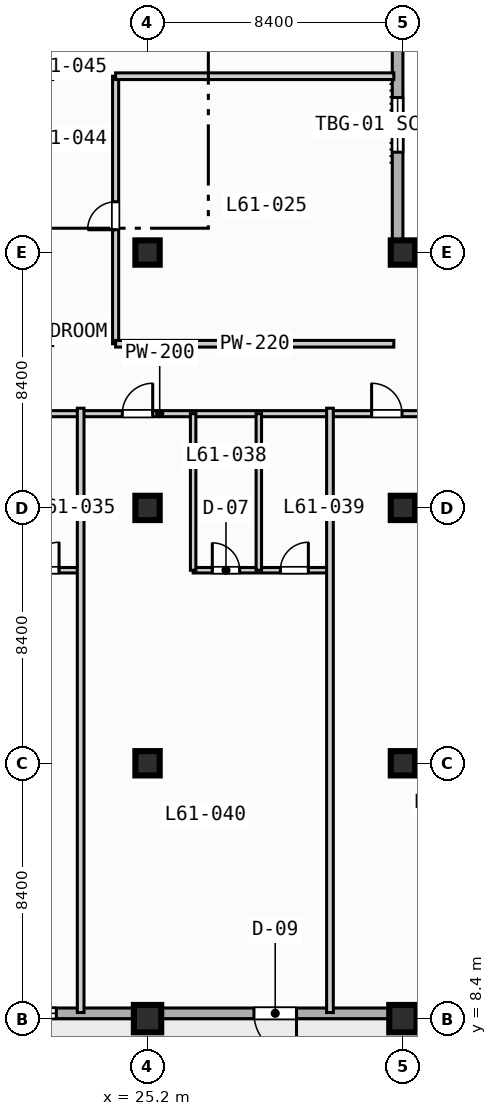
"""IFC4 building model, lengths in metres.
Left out: names, types, materials, properties, quantities, classifications, styles, units other than length and angle.
Written with IfcOpenShell. Run it as: python <this file> out.ifc"""

import sys

from ifc_helpers import new_model, si_unit, direction, frame, frame_2d, origin, origin_2d, place, context, subcontext, project, spatial, rectangle, extrude, element, fill, save


model = new_model("IFC4")
c1 = context("Model", 3, precision=1e-05, world=origin(), true_north=direction((0.0, 1.0)))
c2 = subcontext(c1, "Body", "Model", "MODEL_VIEW")
j1 = project(units=[si_unit("LENGTHUNIT", "METRE"), si_unit("PLANEANGLEUNIT", "RADIAN")], contexts=[c1])
p1 = place(None, origin())
s1 = spatial("IfcSite", under=j1, at=p1, CompositionType="ELEMENT")
p2 = place(p1, origin())
s2 = spatial("IfcBuilding", under=s1, at=p2, CompositionType="ELEMENT")
p3 = place(p2, frame((0.0, 0.0, 249.0)))
s3 = spatial("IfcBuildingStorey", under=s2, at=p3, CompositionType="ELEMENT", Elevation=249.0)
p4 = place(p3, frame((25.2, 8.4, 0.0), z_axis=(0.0, 0.0, 1.0), x_axis=(1.0, 0.0, 0.0)))
e1 = element("IfcColumn", 1, at=p4, inside=s3, PredefinedType="COLUMN", context=c2, shape_type="SweptSolid", body=[
    extrude(rectangle(XDim=0.9, YDim=0.9, at=origin_2d()), origin(), (0.0, 0.0, 1.0), 3.7),
])
for number, where, z_axis, x_axis in (
    (2, (25.2, 16.8, 0.0), (0.0, 0.0, 1.0), (1.0, 0.0, 0.0)),
    (3, (25.2, 25.2, 0.0), (0.0, 0.0, 1.0), (1.0, 0.0, 0.0)),
    (4, (25.2, 33.6, 0.0), (0.0, 0.0, 1.0), (1.0, 0.0, 0.0)),
):
    element("IfcColumn", number, at=place(p3, frame(where, z_axis=z_axis, x_axis=x_axis)), inside=s3, PredefinedType="COLUMN", context=c2, shape_type="SweptSolid", body=[
        extrude(rectangle(XDim=0.8, YDim=0.8, at=origin_2d()), origin(), (0.0, 0.0, 1.0), 3.7),
    ])
p5 = place(p3, frame((33.6, 8.4, 0.0), z_axis=(0.0, 0.0, 1.0), x_axis=(1.0, 0.0, 0.0)))
e5 = element("IfcColumn", 5, at=p5, inside=s3, PredefinedType="COLUMN", context=c2, shape_type="SweptSolid", body=[
    extrude(rectangle(XDim=0.9, YDim=0.9, at=origin_2d()), origin(), (0.0, 0.0, 1.0), 3.7),
])
for number, where, z_axis, x_axis in (
    (6, (33.6, 16.8, 0.0), (0.0, 0.0, 1.0), (1.0, 0.0, 0.0)),
    (7, (33.6, 25.2, 0.0), (0.0, 0.0, 1.0), (1.0, 0.0, 0.0)),
    (8, (33.6, 33.6, 0.0), (0.0, 0.0, 1.0), (1.0, 0.0, 0.0)),
):
    element("IfcColumn", number, at=place(p3, frame(where, z_axis=z_axis, x_axis=x_axis)), inside=s3, PredefinedType="COLUMN", context=c2, shape_type="SweptSolid", body=[
        extrude(rectangle(XDim=0.8, YDim=0.8, at=origin_2d()), origin(), (0.0, 0.0, 1.0), 3.7),
    ])
p6 = place(p3, frame((33.425, 72.425, 0.0), z_axis=(0.0, 0.0, 1.0), x_axis=(0.0, -1.0, 0.0)))
e9 = element("IfcWall", 9, at=p6, inside=s3, PredefinedType="STANDARD", context=c2, shape_type="SweptSolid", body=[
    extrude(rectangle(XDim=39.0, YDim=0.35, at=frame_2d((19.5, 0.0))), origin(), (0.0, 0.0, 1.0), 3.47),
])
p7 = place(p6, frame((33.725, 0.0, 0.85)))
e10 = element("IfcOpeningElement", 10, at=p7, cuts=e9, PredefinedType="OPENING", context=c2, shape_type="SweptSolid", body=[
    extrude(rectangle(XDim=1.8, YDim=1.8, at=frame_2d((0.9, 0.9))), frame((0.0, 0.185, 0.0), z_axis=(0.0, -1.0, 0.0), x_axis=(1.0, 0.0, 0.0)), (0.0, 0.0, 1.0), 0.37),
])
p8 = place(p6, frame((8.225, 0.0, 0.85)))
e11 = element("IfcOpeningElement", 11, at=p8, cuts=e9, PredefinedType="OPENING", context=c2, shape_type="SweptSolid", body=[
    extrude(rectangle(XDim=2.4, YDim=1.95, at=frame_2d((1.2, 0.975))), frame((0.0, 0.185, 0.0), z_axis=(0.0, -1.0, 0.0), x_axis=(1.0, 0.0, 0.0)), (0.0, 0.0, 1.0), 0.37),
])
p9 = place(p3, frame((33.425, 33.425, 0.0), z_axis=(0.0, 0.0, 1.0), x_axis=(1.0, 0.0, 0.0)))
e12 = element("IfcWall", 12, at=p9, inside=s3, PredefinedType="STANDARD", context=c2, shape_type="SweptSolid", body=[
    extrude(rectangle(XDim=39.0, YDim=0.35, at=frame_2d((19.5, 0.0))), origin(), (0.0, 0.0, 1.0), 3.47),
])
p10 = place(p9, frame((12.075, 0.0, 0.0)))
e13 = element("IfcOpeningElement", 13, at=p10, cuts=e12, PredefinedType="OPENING", context=c2, shape_type="SweptSolid", body=[
    extrude(rectangle(XDim=1.4, YDim=2.2, at=frame_2d((0.7, 1.1))), frame((0.0, 0.185, 0.0), z_axis=(0.0, -1.0, 0.0), x_axis=(1.0, 0.0, 0.0)), (0.0, 0.0, 1.0), 0.37),
])
p11 = place(p3, frame((72.425, 8.575, 0.0), z_axis=(0.0, 0.0, 1.0), x_axis=(-1.0, 0.0, 0.0)))
e14 = element("IfcWall", 14, at=p11, inside=s3, PredefinedType="STANDARD", context=c2, shape_type="SweptSolid", body=[
    extrude(rectangle(XDim=60.85, YDim=0.35, at=frame_2d((30.425, 0.0))), origin(), (0.0, 0.0, 1.0), 3.47),
])
p12 = place(p11, frame((42.325, 0.0, 0.0)))
e15 = element("IfcOpeningElement", 15, at=p12, cuts=e14, PredefinedType="OPENING", context=c2, shape_type="SweptSolid", body=[
    extrude(rectangle(XDim=1.4, YDim=2.2, at=frame_2d((0.7, 1.1))), frame((0.0, 0.185, 0.0), z_axis=(0.0, -1.0, 0.0), x_axis=(1.0, 0.0, 0.0)), (0.0, 0.0, 1.0), 0.37),
])
p13 = place(p11, frame((50.225, 0.0, 0.85)))
e16 = element("IfcOpeningElement", 16, at=p13, cuts=e14, PredefinedType="OPENING", context=c2, shape_type="SweptSolid", body=[
    extrude(rectangle(XDim=2.4, YDim=1.95, at=frame_2d((1.2, 0.975))), frame((0.0, 0.185, 0.0), z_axis=(0.0, -1.0, 0.0), x_axis=(1.0, 0.0, 0.0)), (0.0, 0.0, 1.0), 0.37),
])
p14 = place(p11, frame((33.425, 0.0, 0.85)))
e17 = element("IfcOpeningElement", 17, at=p14, cuts=e14, PredefinedType="OPENING", context=c2, shape_type="SweptSolid", body=[
    extrude(rectangle(XDim=2.4, YDim=1.95, at=frame_2d((1.2, 0.975))), frame((0.0, 0.185, 0.0), z_axis=(0.0, -1.0, 0.0), x_axis=(1.0, 0.0, 0.0)), (0.0, 0.0, 1.0), 0.37),
])
p15 = place(p11, frame((25.325, 0.0, 0.85)))
e18 = element("IfcOpeningElement", 18, at=p15, cuts=e14, PredefinedType="OPENING", context=c2, shape_type="SweptSolid", body=[
    extrude(rectangle(XDim=1.8, YDim=1.8, at=frame_2d((0.9, 0.9))), frame((0.0, 0.185, 0.0), z_axis=(0.0, -1.0, 0.0), x_axis=(1.0, 0.0, 0.0)), (0.0, 0.0, 1.0), 0.37),
])
p16 = place(p11, frame((58.675, 0.0, 0.85)))
e19 = element("IfcOpeningElement", 19, at=p16, cuts=e14, PredefinedType="OPENING", context=c2, shape_type="SweptSolid", body=[
    extrude(rectangle(XDim=1.8, YDim=1.8, at=frame_2d((0.9, 0.9))), frame((0.0, 0.185, 0.0), z_axis=(0.0, -1.0, 0.0), x_axis=(1.0, 0.0, 0.0)), (0.0, 0.0, 1.0), 0.37),
])
p17 = place(p3, frame((24.15, 30.6, 0.0), z_axis=(0.0, 0.0, 1.0), x_axis=(0.0, 1.0, 0.0)))
e20 = element("IfcWall", 20, at=p17, inside=s3, PredefinedType="PARTITIONING", context=c2, shape_type="SweptSolid", body=[
    extrude(rectangle(XDim=8.8, YDim=0.2, at=frame_2d((4.4, 0.0))), origin(), (0.0, 0.0, 1.0), 3.47),
])
p18 = place(p17, frame((3.75, 0.0, 0.0)))
e21 = element("IfcOpeningElement", 21, at=p18, cuts=e20, PredefinedType="OPENING", context=c2, shape_type="SweptSolid", body=[
    extrude(rectangle(XDim=0.92, YDim=2.1, at=frame_2d((0.46, 1.05))), frame((0.0, 0.11, 0.0), z_axis=(0.0, -1.0, 0.0), x_axis=(1.0, 0.0, 0.0)), (0.0, 0.0, 1.0), 0.22),
])
for number, where, z_axis, x_axis in (
    (22, (24.15, 30.6, 0.0), (0.0, 0.0, 1.0), (1.0, 0.0, 0.0)),
    (23, (24.15, 39.4, 0.0), (0.0, 0.0, 1.0), (1.0, 0.0, 0.0)),
):
    element("IfcWall", number, at=place(p3, frame(where, z_axis=z_axis, x_axis=x_axis)), inside=s3, PredefinedType="PARTITIONING", context=c2, shape_type="SweptSolid", body=[
        extrude(rectangle(XDim=9.15, YDim=0.22, at=frame_2d((4.575, 0.0))), origin(), (0.0, 0.0, 1.0), 3.47),
    ])
p19 = place(p3, frame((11.8, 28.3, 0.0), z_axis=(0.0, 0.0, 1.0), x_axis=(1.0, 0.0, 0.0)))
e24 = element("IfcWall", 24, at=p19, inside=s3, PredefinedType="PARTITIONING", context=c2, shape_type="SweptSolid", body=[
    extrude(rectangle(XDim=27.6, YDim=0.2, at=frame_2d((13.8, 0.0))), origin(), (0.0, 0.0, 1.0), 3.47),
])
p20 = place(p19, frame((3.92, 0.0, 0.0)))
e25 = element("IfcOpeningElement", 25, at=p20, cuts=e24, PredefinedType="OPENING", context=c2, shape_type="SweptSolid", body=[
    extrude(rectangle(XDim=1.0, YDim=2.15, at=frame_2d((0.5, 1.075))), frame((0.0, 0.11, 0.0), z_axis=(0.0, -1.0, 0.0), x_axis=(1.0, 0.0, 0.0)), (0.0, 0.0, 1.0), 0.22),
])
p21 = place(p19, frame((12.57, 0.0, 0.0)))
e26 = element("IfcOpeningElement", 26, at=p21, cuts=e24, PredefinedType="OPENING", context=c2, shape_type="SweptSolid", body=[
    extrude(rectangle(XDim=1.0, YDim=2.15, at=frame_2d((0.5, 1.075))), frame((0.0, 0.11, 0.0), z_axis=(0.0, -1.0, 0.0), x_axis=(1.0, 0.0, 0.0)), (0.0, 0.0, 1.0), 0.22),
])
p22 = place(p19, frame((20.77, 0.0, 0.0)))
e27 = element("IfcOpeningElement", 27, at=p22, cuts=e24, PredefinedType="OPENING", context=c2, shape_type="SweptSolid", body=[
    extrude(rectangle(XDim=1.0, YDim=2.15, at=frame_2d((0.5, 1.075))), frame((0.0, 0.11, 0.0), z_axis=(0.0, -1.0, 0.0), x_axis=(1.0, 0.0, 0.0)), (0.0, 0.0, 1.0), 0.22),
])
p23 = place(p3, frame((18.5, 23.15, 0.0), z_axis=(0.0, 0.0, 1.0), x_axis=(1.0, 0.0, 0.0)))
e28 = element("IfcWall", 28, at=p23, inside=s3, PredefinedType="PLUMBINGWALL", context=c2, shape_type="SweptSolid", body=[
    extrude(rectangle(XDim=4.5, YDim=0.18, at=frame_2d((2.25, 0.0))), origin(), (0.0, 0.0, 1.0), 3.47),
])
p24 = place(p23, frame((0.63, 0.0, 0.0)))
e29 = element("IfcOpeningElement", 29, at=p24, cuts=e28, PredefinedType="OPENING", context=c2, shape_type="SweptSolid", body=[
    extrude(rectangle(XDim=0.9, YDim=2.1, at=frame_2d((0.45, 1.05))), frame((0.0, 0.1, 0.0), z_axis=(0.0, -1.0, 0.0), x_axis=(1.0, 0.0, 0.0)), (0.0, 0.0, 1.0), 0.2),
])
p25 = place(p23, frame((2.87, 0.0, 0.0)))
e30 = element("IfcOpeningElement", 30, at=p25, cuts=e28, PredefinedType="OPENING", context=c2, shape_type="SweptSolid", body=[
    extrude(rectangle(XDim=0.92, YDim=2.1, at=frame_2d((0.46, 1.05))), frame((0.0, 0.1, 0.0), z_axis=(0.0, -1.0, 0.0), x_axis=(1.0, 0.0, 0.0)), (0.0, 0.0, 1.0), 0.2),
])
p26 = place(p3, frame((23.0, 8.6, 0.0), z_axis=(0.0, 0.0, 1.0), x_axis=(0.0, 1.0, 0.0)))
e31 = element("IfcWall", 31, at=p26, inside=s3, PredefinedType="PARTITIONING", context=c2, shape_type="SweptSolid", body=[
    extrude(rectangle(XDim=19.88, YDim=0.22, at=frame_2d((9.94, 0.0))), origin(), (0.0, 0.0, 1.0), 3.47),
])
p27 = place(p3, frame((26.7, 23.15, 0.0), z_axis=(0.0, 0.0, 1.0), x_axis=(1.0, 0.0, 0.0)))
e32 = element("IfcWall", 32, at=p27, inside=s3, PredefinedType="PLUMBINGWALL", context=c2, shape_type="SweptSolid", body=[
    extrude(rectangle(XDim=4.5, YDim=0.18, at=frame_2d((2.25, 0.0))), origin(), (0.0, 0.0, 1.0), 3.47),
])
p28 = place(p27, frame((0.63, 0.0, 0.0)))
e33 = element("IfcOpeningElement", 33, at=p28, cuts=e32, PredefinedType="OPENING", context=c2, shape_type="SweptSolid", body=[
    extrude(rectangle(XDim=0.9, YDim=2.1, at=frame_2d((0.45, 1.05))), frame((0.0, 0.1, 0.0), z_axis=(0.0, -1.0, 0.0), x_axis=(1.0, 0.0, 0.0)), (0.0, 0.0, 1.0), 0.2),
])
p29 = place(p27, frame((2.87, 0.0, 0.0)))
e34 = element("IfcOpeningElement", 34, at=p29, cuts=e32, PredefinedType="OPENING", context=c2, shape_type="SweptSolid", body=[
    extrude(rectangle(XDim=0.92, YDim=2.1, at=frame_2d((0.46, 1.05))), frame((0.0, 0.1, 0.0), z_axis=(0.0, -1.0, 0.0), x_axis=(1.0, 0.0, 0.0)), (0.0, 0.0, 1.0), 0.2),
])
for number, where, z_axis, x_axis in (
    (35, (26.7, 23.15, 0.0), (0.0, 0.0, 1.0), (0.0, 1.0, 0.0)),
    (36, (28.86, 23.15, 0.0), (0.0, 0.0, 1.0), (0.0, 1.0, 0.0)),
):
    element("IfcWall", number, at=place(p3, frame(where, z_axis=z_axis, x_axis=x_axis)), inside=s3, PredefinedType="PLUMBINGWALL", context=c2, shape_type="SweptSolid", body=[
        extrude(rectangle(XDim=5.15, YDim=0.18, at=frame_2d((2.575, 0.0))), origin(), (0.0, 0.0, 1.0), 3.47),
    ])
p30 = place(p3, frame((31.2, 8.6, 0.0), z_axis=(0.0, 0.0, 1.0), x_axis=(0.0, 1.0, 0.0)))
e37 = element("IfcWall", 37, at=p30, inside=s3, PredefinedType="PARTITIONING", context=c2, shape_type="SweptSolid", body=[
    extrude(rectangle(XDim=19.88, YDim=0.22, at=frame_2d((9.94, 0.0))), origin(), (0.0, 0.0, 1.0), 3.47),
])
p31 = place(p7, origin())
e38 = element("IfcWindow", 38, at=p31, inside=s3, PartitioningType="SINGLE_PANEL", PredefinedType="WINDOW", context=c2, shape_type="SweptSolid", body=[
    extrude(rectangle(XDim=1.8, YDim=1.8, at=frame_2d((0.9, 0.9))), frame((0.0, 0.03, 0.0), z_axis=(0.0, -1.0, 0.0), x_axis=(1.0, 0.0, 0.0)), (0.0, 0.0, 1.0), 0.06),
])
fill(e10, e38)
p32 = place(p12, origin())
e39 = element("IfcDoor", 39, at=p32, inside=s3, OperationType="SINGLE_SWING_LEFT", PredefinedType="DOOR", context=c2, shape_type="SweptSolid", body=[
    extrude(rectangle(XDim=1.4, YDim=2.2, at=frame_2d((0.7, 1.1))), frame((0.0, 0.025, 0.0), z_axis=(0.0, -1.0, 0.0), x_axis=(1.0, 0.0, 0.0)), (0.0, 0.0, 1.0), 0.05),
])
fill(e15, e39)
p33 = place(p13, origin())
e40 = element("IfcWindow", 40, at=p33, inside=s3, PartitioningType="SINGLE_PANEL", PredefinedType="WINDOW", context=c2, shape_type="SweptSolid", body=[
    extrude(rectangle(XDim=2.4, YDim=1.95, at=frame_2d((1.2, 0.975))), frame((0.0, 0.03, 0.0), z_axis=(0.0, -1.0, 0.0), x_axis=(1.0, 0.0, 0.0)), (0.0, 0.0, 1.0), 0.06),
])
fill(e16, e40)
p34 = place(p18, origin())
e41 = element("IfcDoor", 41, at=p34, inside=s3, OperationType="SINGLE_SWING_LEFT", PredefinedType="DOOR", context=c2, shape_type="SweptSolid", body=[
    extrude(rectangle(XDim=0.92, YDim=2.1, at=frame_2d((0.46, 1.05))), frame((0.0, 0.025, 0.0), z_axis=(0.0, -1.0, 0.0), x_axis=(1.0, 0.0, 0.0)), (0.0, 0.0, 1.0), 0.05),
])
fill(e21, e41)
p35 = place(p21, origin())
e42 = element("IfcDoor", 42, at=p35, inside=s3, OperationType="SINGLE_SWING_RIGHT", PredefinedType="DOOR", context=c2, shape_type="SweptSolid", body=[
    extrude(rectangle(XDim=1.0, YDim=2.15, at=frame_2d((0.5, 1.075))), frame((0.0, 0.025, 0.0), z_axis=(0.0, -1.0, 0.0), x_axis=(1.0, 0.0, 0.0)), (0.0, 0.0, 1.0), 0.05),
])
fill(e26, e42)
p36 = place(p22, origin())
e43 = element("IfcDoor", 43, at=p36, inside=s3, OperationType="SINGLE_SWING_LEFT", PredefinedType="DOOR", context=c2, shape_type="SweptSolid", body=[
    extrude(rectangle(XDim=1.0, YDim=2.15, at=frame_2d((0.5, 1.075))), frame((0.0, 0.025, 0.0), z_axis=(0.0, -1.0, 0.0), x_axis=(1.0, 0.0, 0.0)), (0.0, 0.0, 1.0), 0.05),
])
fill(e27, e43)
p37 = place(p25, origin())
e44 = element("IfcDoor", 44, at=p37, inside=s3, OperationType="SINGLE_SWING_RIGHT", PredefinedType="DOOR", context=c2, shape_type="SweptSolid", body=[
    extrude(rectangle(XDim=0.92, YDim=2.1, at=frame_2d((0.46, 1.05))), frame((0.0, 0.025, 0.0), z_axis=(0.0, -1.0, 0.0), x_axis=(1.0, 0.0, 0.0)), (0.0, 0.0, 1.0), 0.05),
])
fill(e30, e44)
p38 = place(p28, origin())
e45 = element("IfcDoor", 45, at=p38, inside=s3, OperationType="SINGLE_SWING_LEFT", PredefinedType="DOOR", context=c2, shape_type="SweptSolid", body=[
    extrude(rectangle(XDim=0.9, YDim=2.1, at=frame_2d((0.45, 1.05))), frame((0.0, 0.025, 0.0), z_axis=(0.0, -1.0, 0.0), x_axis=(1.0, 0.0, 0.0)), (0.0, 0.0, 1.0), 0.05),
])
fill(e33, e45)
p39 = place(p29, origin())
e46 = element("IfcDoor", 46, at=p39, inside=s3, OperationType="SINGLE_SWING_RIGHT", PredefinedType="DOOR", context=c2, shape_type="SweptSolid", body=[
    extrude(rectangle(XDim=0.92, YDim=2.1, at=frame_2d((0.46, 1.05))), frame((0.0, 0.025, 0.0), z_axis=(0.0, -1.0, 0.0), x_axis=(1.0, 0.0, 0.0)), (0.0, 0.0, 1.0), 0.05),
])
fill(e34, e46)
save(model, sys.argv[1])
